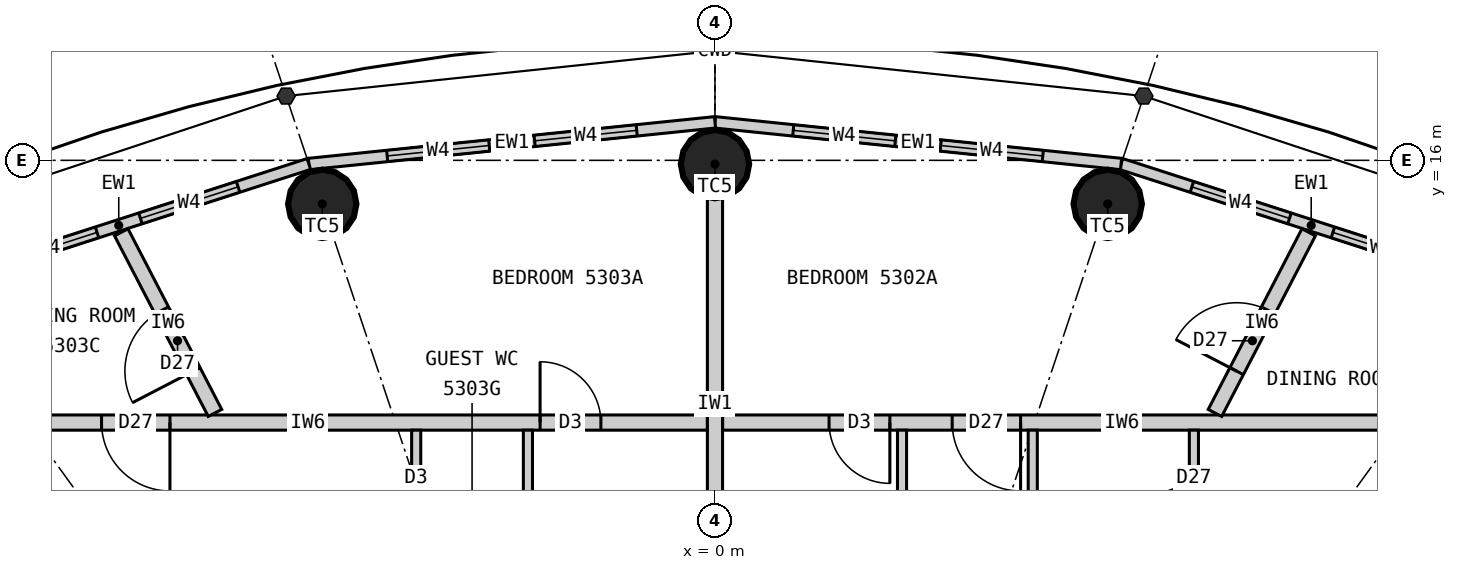
"""IFC4 building model, lengths in metres.
Left out: names, types, materials, properties, quantities, classifications, styles, units other than length and angle.
Written with IfcOpenShell. Run it as: python <this file> out.ifc"""

import sys

from ifc_helpers import new_model, si_unit, direction, frame, frame_2d, origin, origin_2d, place, context, subcontext, project, spatial, rectangle, circle, extrude, element, fill, save


model = new_model("IFC4")
c1 = context("Model", 3, precision=1e-05, world=origin(), true_north=direction((0.0, 1.0)))
c2 = subcontext(c1, "Body", "Model", "MODEL_VIEW")
j1 = project(units=[si_unit("LENGTHUNIT", "METRE"), si_unit("PLANEANGLEUNIT", "RADIAN")], contexts=[c1])
p1 = place(None, origin())
s1 = spatial("IfcSite", under=j1, at=p1, CompositionType="ELEMENT")
p2 = place(p1, origin())
s2 = spatial("IfcBuilding", under=s1, at=p2, CompositionType="ELEMENT")
p3 = place(p2, frame((0.0, 0.0, 199.5)))
s3 = spatial("IfcBuildingStorey", under=s2, at=p3, CompositionType="ELEMENT", Elevation=199.5)
for number, where, z_axis, x_axis in (
    (1, (5.167, 15.427, 0.0), (0.0, 0.0, 1.0), (1.0, 0.0, 0.0)),
    (2, (0.0, 15.95, 0.0), (0.0, 0.0, 1.0), (1.0, 0.0, 0.0)),
    (3, (-5.167, 15.427, 0.0), (0.0, 0.0, 1.0), (1.0, 0.0, 0.0)),
):
    element("IfcColumn", number, at=place(p3, frame(where, z_axis=z_axis, x_axis=x_axis)), inside=s3, PredefinedType="COLUMN", context=c2, shape_type="SweptSolid", body=[
        extrude(circle(Radius=0.45, at=origin_2d()), origin(), (0.0, 0.0, 1.0), 3.3),
    ])
p4 = place(p3, frame((10.346, 14.336, 0.0), z_axis=(0.0, 0.0, 1.0), x_axis=(-0.951644702515, 0.307200846638, 0.0)))
e4 = element("IfcWall", 4, at=p4, inside=s3, PredefinedType="ELEMENTEDWALL", context=c2, shape_type="SweptSolid", body=[
    extrude(rectangle(XDim=5.258, YDim=0.15, at=frame_2d((2.629, 0.0))), origin(), (0.0, 0.0, 1.0), 3.12),
])
p5 = place(p4, frame((0.979, 0.0, 0.9)))
e5 = element("IfcOpeningElement", 5, at=p5, cuts=e4, PredefinedType="OPENING", context=c2, shape_type="SweptSolid", body=[
    extrude(rectangle(XDim=1.35, YDim=1.9, at=frame_2d((0.675, 0.95))), frame((0.0, 0.085, 0.0), z_axis=(0.0, -1.0, 0.0), x_axis=(1.0, 0.0, 0.0)), (0.0, 0.0, 1.0), 0.17),
])
p6 = place(p4, frame((2.929, 0.0, 0.9)))
e6 = element("IfcOpeningElement", 6, at=p6, cuts=e4, PredefinedType="OPENING", context=c2, shape_type="SweptSolid", body=[
    extrude(rectangle(XDim=1.35, YDim=1.9, at=frame_2d((0.675, 0.95))), frame((0.0, 0.085, 0.0), z_axis=(0.0, -1.0, 0.0), x_axis=(1.0, 0.0, 0.0)), (0.0, 0.0, 1.0), 0.17),
])
p7 = place(p3, frame((5.343, 15.952, 0.0), z_axis=(0.0, 0.0, 1.0), x_axis=(-0.994774574972, 0.102095763818, 0.0)))
e7 = element("IfcWall", 7, at=p7, inside=s3, PredefinedType="ELEMENTEDWALL", context=c2, shape_type="SweptSolid", body=[
    extrude(rectangle(XDim=5.371, YDim=0.15, at=frame_2d((2.686, 0.0))), origin(), (0.0, 0.0, 1.0), 3.12),
])
p8 = place(p7, frame((1.035, 0.0, 0.9)))
e8 = element("IfcOpeningElement", 8, at=p8, cuts=e7, PredefinedType="OPENING", context=c2, shape_type="SweptSolid", body=[
    extrude(rectangle(XDim=1.35, YDim=1.9, at=frame_2d((0.675, 0.95))), frame((0.0, 0.085, 0.0), z_axis=(0.0, -1.0, 0.0), x_axis=(1.0, 0.0, 0.0)), (0.0, 0.0, 1.0), 0.17),
])
p9 = place(p7, frame((2.985, 0.0, 0.9)))
e9 = element("IfcOpeningElement", 9, at=p9, cuts=e7, PredefinedType="OPENING", context=c2, shape_type="SweptSolid", body=[
    extrude(rectangle(XDim=1.35, YDim=1.9, at=frame_2d((0.675, 0.95))), frame((0.0, 0.085, 0.0), z_axis=(0.0, -1.0, 0.0), x_axis=(1.0, 0.0, 0.0)), (0.0, 0.0, 1.0), 0.17),
])
p10 = place(p3, frame((0.0, 16.5, 0.0), z_axis=(0.0, 0.0, 1.0), x_axis=(-0.994774574972, -0.102095763818, 0.0)))
e10 = element("IfcWall", 10, at=p10, inside=s3, PredefinedType="ELEMENTEDWALL", context=c2, shape_type="SweptSolid", body=[
    extrude(rectangle(XDim=5.371, YDim=0.15, at=frame_2d((2.686, 0.0))), origin(), (0.0, 0.0, 1.0), 3.12),
])
p11 = place(p10, frame((1.035, 0.0, 0.9)))
e11 = element("IfcOpeningElement", 11, at=p11, cuts=e10, PredefinedType="OPENING", context=c2, shape_type="SweptSolid", body=[
    extrude(rectangle(XDim=1.35, YDim=1.9, at=frame_2d((0.675, 0.95))), frame((0.0, 0.085, 0.0), z_axis=(0.0, -1.0, 0.0), x_axis=(1.0, 0.0, 0.0)), (0.0, 0.0, 1.0), 0.17),
])
p12 = place(p10, frame((2.985, 0.0, 0.9)))
e12 = element("IfcOpeningElement", 12, at=p12, cuts=e10, PredefinedType="OPENING", context=c2, shape_type="SweptSolid", body=[
    extrude(rectangle(XDim=1.35, YDim=1.9, at=frame_2d((0.675, 0.95))), frame((0.0, 0.085, 0.0), z_axis=(0.0, -1.0, 0.0), x_axis=(1.0, 0.0, 0.0)), (0.0, 0.0, 1.0), 0.17),
])
p13 = place(p3, frame((-5.343, 15.952, 0.0), z_axis=(0.0, 0.0, 1.0), x_axis=(-0.951644702515, -0.307200846638, 0.0)))
e13 = element("IfcWall", 13, at=p13, inside=s3, PredefinedType="ELEMENTEDWALL", context=c2, shape_type="SweptSolid", body=[
    extrude(rectangle(XDim=5.258, YDim=0.15, at=frame_2d((2.629, 0.0))), origin(), (0.0, 0.0, 1.0), 3.12),
])
p14 = place(p13, frame((0.979, 0.0, 0.9)))
e14 = element("IfcOpeningElement", 14, at=p14, cuts=e13, PredefinedType="OPENING", context=c2, shape_type="SweptSolid", body=[
    extrude(rectangle(XDim=1.35, YDim=1.9, at=frame_2d((0.675, 0.95))), frame((0.0, 0.085, 0.0), z_axis=(0.0, -1.0, 0.0), x_axis=(1.0, 0.0, 0.0)), (0.0, 0.0, 1.0), 0.17),
])
p15 = place(p13, frame((2.929, 0.0, 0.9)))
e15 = element("IfcOpeningElement", 15, at=p15, cuts=e13, PredefinedType="OPENING", context=c2, shape_type="SweptSolid", body=[
    extrude(rectangle(XDim=1.35, YDim=1.9, at=frame_2d((0.675, 0.95))), frame((0.0, 0.085, 0.0), z_axis=(0.0, -1.0, 0.0), x_axis=(1.0, 0.0, 0.0)), (0.0, 0.0, 1.0), 0.17),
])
p16 = place(p3, frame((0.0, 10.1, 0.0), z_axis=(0.0, 0.0, 1.0), x_axis=(0.0, 1.0, 0.0)))
e16 = element("IfcWall", 16, at=p16, inside=s3, PredefinedType="PARTITIONING", context=c2, shape_type="SweptSolid", body=[
    extrude(rectangle(XDim=5.4, YDim=0.2, at=frame_2d((2.7, 0.0))), origin(), (0.0, 0.0, 1.0), 2.42),
])
p17 = place(p3, frame((10.609, 12.55, 0.0), z_axis=(0.0, 0.0, 1.0), x_axis=(-1.0, 0.0, 0.0)))
e17 = element("IfcWall", 17, at=p17, inside=s3, PredefinedType="PARTITIONING", context=c2, shape_type="SweptSolid", body=[
    extrude(rectangle(XDim=10.508, YDim=0.2, at=frame_2d((5.254, 0.0))), origin(), (0.0, 0.0, 1.0), 3.12),
])
p18 = place(p17, frame((6.588, 0.0, 0.0)))
e18 = element("IfcOpeningElement", 18, at=p18, cuts=e17, PredefinedType="OPENING", context=c2, shape_type="SweptSolid", body=[
    extrude(rectangle(XDim=0.9, YDim=2.1, at=frame_2d((0.45, 1.05))), frame((0.0, 0.11, 0.0), z_axis=(0.0, -1.0, 0.0), x_axis=(1.0, 0.0, 0.0)), (0.0, 0.0, 1.0), 0.22),
])
p19 = place(p17, frame((8.308, 0.0, 0.0)))
e19 = element("IfcOpeningElement", 19, at=p19, cuts=e17, PredefinedType="OPENING", context=c2, shape_type="SweptSolid", body=[
    extrude(rectangle(XDim=0.8, YDim=2.1, at=frame_2d((0.4, 1.05))), frame((0.0, 0.11, 0.0), z_axis=(0.0, -1.0, 0.0), x_axis=(1.0, 0.0, 0.0)), (0.0, 0.0, 1.0), 0.22),
])
p20 = place(p3, frame((6.578, 12.677, 0.0), z_axis=(0.0, 0.0, 1.0), x_axis=(0.460620531465, 0.887597164255, 0.0)))
e20 = element("IfcWall", 20, at=p20, inside=s3, PredefinedType="PARTITIONING", context=c2, shape_type="SweptSolid", body=[
    extrude(rectangle(XDim=2.678, YDim=0.2, at=frame_2d((1.339, 0.0))), origin(), (0.0, 0.0, 1.0), 3.12),
])
p21 = place(p20, frame((0.62, 0.0, 0.0)))
e21 = element("IfcOpeningElement", 21, at=p21, cuts=e20, PredefinedType="OPENING", context=c2, shape_type="SweptSolid", body=[
    extrude(rectangle(XDim=0.9, YDim=2.1, at=frame_2d((0.45, 1.05))), frame((0.0, 0.11, 0.0), z_axis=(0.0, -1.0, 0.0), x_axis=(1.0, 0.0, 0.0)), (0.0, 0.0, 1.0), 0.22),
])
p22 = place(p3, frame((6.301, 10.1, 0.0), z_axis=(0.0, 0.0, 1.0), x_axis=(0.0, 1.0, 0.0)))
e22 = element("IfcWall", 22, at=p22, inside=s3, PredefinedType="PARTITIONING", context=c2, shape_type="SweptSolid", body=[
    extrude(rectangle(XDim=2.35, YDim=0.12, at=frame_2d((1.175, 0.0))), origin(), (0.0, 0.0, 1.0), 3.12),
])
p23 = place(p22, frame((0.72, 0.0, 0.0)))
e23 = element("IfcOpeningElement", 23, at=p23, cuts=e22, PredefinedType="OPENING", context=c2, shape_type="SweptSolid", body=[
    extrude(rectangle(XDim=0.9, YDim=2.1, at=frame_2d((0.45, 1.05))), frame((0.0, 0.07, 0.0), z_axis=(0.0, -1.0, 0.0), x_axis=(1.0, 0.0, 0.0)), (0.0, 0.0, 1.0), 0.14),
])
for number, where, z_axis, x_axis in (
    (24, (4.181, 10.1, 0.0), (0.0, 0.0, 1.0), (0.0, 1.0, 0.0)),
    (25, (2.461, 10.1, 0.0), (0.0, 0.0, 1.0), (0.0, 1.0, 0.0)),
):
    element("IfcWall", number, at=place(p3, frame(where, z_axis=z_axis, x_axis=x_axis)), inside=s3, PredefinedType="PARTITIONING", context=c2, shape_type="SweptSolid", body=[
        extrude(rectangle(XDim=2.35, YDim=0.12, at=frame_2d((1.175, 0.0))), origin(), (0.0, 0.0, 1.0), 3.12),
    ])
p24 = place(p3, frame((-0.101, 12.55, 0.0), z_axis=(0.0, 0.0, 1.0), x_axis=(-1.0, 0.0, 0.0)))
e26 = element("IfcWall", 26, at=p24, inside=s3, PredefinedType="PARTITIONING", context=c2, shape_type="SweptSolid", body=[
    extrude(rectangle(XDim=10.508, YDim=0.2, at=frame_2d((5.254, 0.0))), origin(), (0.0, 0.0, 1.0), 3.12),
])
p25 = place(p24, frame((1.4, 0.0, 0.0)))
e27 = element("IfcOpeningElement", 27, at=p25, cuts=e26, PredefinedType="OPENING", context=c2, shape_type="SweptSolid", body=[
    extrude(rectangle(XDim=0.8, YDim=2.1, at=frame_2d((0.4, 1.05))), frame((0.0, 0.11, 0.0), z_axis=(0.0, -1.0, 0.0), x_axis=(1.0, 0.0, 0.0)), (0.0, 0.0, 1.0), 0.22),
])
p26 = place(p24, frame((7.07, 0.0, 0.0)))
e28 = element("IfcOpeningElement", 28, at=p26, cuts=e26, PredefinedType="OPENING", context=c2, shape_type="SweptSolid", body=[
    extrude(rectangle(XDim=0.9, YDim=2.1, at=frame_2d((0.45, 1.05))), frame((0.0, 0.11, 0.0), z_axis=(0.0, -1.0, 0.0), x_axis=(1.0, 0.0, 0.0)), (0.0, 0.0, 1.0), 0.22),
])
p27 = place(p3, frame((-6.578, 12.677, 0.0), z_axis=(0.0, 0.0, 1.0), x_axis=(-0.460620531465, 0.887597164255, 0.0)))
e29 = element("IfcWall", 29, at=p27, inside=s3, PredefinedType="PARTITIONING", context=c2, shape_type="SweptSolid", body=[
    extrude(rectangle(XDim=2.678, YDim=0.2, at=frame_2d((1.339, 0.0))), origin(), (0.0, 0.0, 1.0), 3.12),
])
p28 = place(p27, frame((0.62, 0.0, 0.0)))
e30 = element("IfcOpeningElement", 30, at=p28, cuts=e29, PredefinedType="OPENING", context=c2, shape_type="SweptSolid", body=[
    extrude(rectangle(XDim=0.9, YDim=2.1, at=frame_2d((0.45, 1.05))), frame((0.0, 0.11, 0.0), z_axis=(0.0, -1.0, 0.0), x_axis=(1.0, 0.0, 0.0)), (0.0, 0.0, 1.0), 0.22),
])
p29 = place(p3, frame((-2.461, 10.1, 0.0), z_axis=(0.0, 0.0, 1.0), x_axis=(0.0, 1.0, 0.0)))
e31 = element("IfcWall", 31, at=p29, inside=s3, PredefinedType="PARTITIONING", context=c2, shape_type="SweptSolid", body=[
    extrude(rectangle(XDim=2.35, YDim=0.12, at=frame_2d((1.175, 0.0))), origin(), (0.0, 0.0, 1.0), 3.12),
])
p30 = place(p3, frame((-3.931, 10.1, 0.0), z_axis=(0.0, 0.0, 1.0), x_axis=(0.0, 1.0, 0.0)))
e32 = element("IfcWall", 32, at=p30, inside=s3, PredefinedType="PARTITIONING", context=c2, shape_type="SweptSolid", body=[
    extrude(rectangle(XDim=2.35, YDim=0.12, at=frame_2d((1.175, 0.0))), origin(), (0.0, 0.0, 1.0), 3.12),
])
p31 = place(p30, frame((0.77, 0.0, 0.0)))
e33 = element("IfcOpeningElement", 33, at=p31, cuts=e32, PredefinedType="OPENING", context=c2, shape_type="SweptSolid", body=[
    extrude(rectangle(XDim=0.8, YDim=2.1, at=frame_2d((0.4, 1.05))), frame((0.0, 0.07, 0.0), z_axis=(0.0, -1.0, 0.0), x_axis=(1.0, 0.0, 0.0)), (0.0, 0.0, 1.0), 0.14),
])
p32 = place(p5, origin())
e34 = element("IfcWindow", 34, at=p32, inside=s3, PartitioningType="SINGLE_PANEL", PredefinedType="WINDOW", context=c2, shape_type="SweptSolid", body=[
    extrude(rectangle(XDim=1.35, YDim=1.9, at=frame_2d((0.675, 0.95))), frame((0.0, 0.03, 0.0), z_axis=(0.0, -1.0, 0.0), x_axis=(1.0, 0.0, 0.0)), (0.0, 0.0, 1.0), 0.06),
])
fill(e5, e34)
p33 = place(p6, origin())
e35 = element("IfcWindow", 35, at=p33, inside=s3, PartitioningType="SINGLE_PANEL", PredefinedType="WINDOW", context=c2, shape_type="SweptSolid", body=[
    extrude(rectangle(XDim=1.35, YDim=1.9, at=frame_2d((0.675, 0.95))), frame((0.0, 0.03, 0.0), z_axis=(0.0, -1.0, 0.0), x_axis=(1.0, 0.0, 0.0)), (0.0, 0.0, 1.0), 0.06),
])
fill(e6, e35)
p34 = place(p8, origin())
e36 = element("IfcWindow", 36, at=p34, inside=s3, PartitioningType="SINGLE_PANEL", PredefinedType="WINDOW", context=c2, shape_type="SweptSolid", body=[
    extrude(rectangle(XDim=1.35, YDim=1.9, at=frame_2d((0.675, 0.95))), frame((0.0, 0.03, 0.0), z_axis=(0.0, -1.0, 0.0), x_axis=(1.0, 0.0, 0.0)), (0.0, 0.0, 1.0), 0.06),
])
fill(e8, e36)
p35 = place(p9, origin())
e37 = element("IfcWindow", 37, at=p35, inside=s3, PartitioningType="SINGLE_PANEL", PredefinedType="WINDOW", context=c2, shape_type="SweptSolid", body=[
    extrude(rectangle(XDim=1.35, YDim=1.9, at=frame_2d((0.675, 0.95))), frame((0.0, 0.03, 0.0), z_axis=(0.0, -1.0, 0.0), x_axis=(1.0, 0.0, 0.0)), (0.0, 0.0, 1.0), 0.06),
])
fill(e9, e37)
p36 = place(p11, origin())
e38 = element("IfcWindow", 38, at=p36, inside=s3, PartitioningType="SINGLE_PANEL", PredefinedType="WINDOW", context=c2, shape_type="SweptSolid", body=[
    extrude(rectangle(XDim=1.35, YDim=1.9, at=frame_2d((0.675, 0.95))), frame((0.0, 0.03, 0.0), z_axis=(0.0, -1.0, 0.0), x_axis=(1.0, 0.0, 0.0)), (0.0, 0.0, 1.0), 0.06),
])
fill(e11, e38)
p37 = place(p12, origin())
e39 = element("IfcWindow", 39, at=p37, inside=s3, PartitioningType="SINGLE_PANEL", PredefinedType="WINDOW", context=c2, shape_type="SweptSolid", body=[
    extrude(rectangle(XDim=1.35, YDim=1.9, at=frame_2d((0.675, 0.95))), frame((0.0, 0.03, 0.0), z_axis=(0.0, -1.0, 0.0), x_axis=(1.0, 0.0, 0.0)), (0.0, 0.0, 1.0), 0.06),
])
fill(e12, e39)
p38 = place(p14, origin())
e40 = element("IfcWindow", 40, at=p38, inside=s3, PartitioningType="SINGLE_PANEL", PredefinedType="WINDOW", context=c2, shape_type="SweptSolid", body=[
    extrude(rectangle(XDim=1.35, YDim=1.9, at=frame_2d((0.675, 0.95))), frame((0.0, 0.03, 0.0), z_axis=(0.0, -1.0, 0.0), x_axis=(1.0, 0.0, 0.0)), (0.0, 0.0, 1.0), 0.06),
])
fill(e14, e40)
p39 = place(p15, origin())
e41 = element("IfcWindow", 41, at=p39, inside=s3, PartitioningType="SINGLE_PANEL", PredefinedType="WINDOW", context=c2, shape_type="SweptSolid", body=[
    extrude(rectangle(XDim=1.35, YDim=1.9, at=frame_2d((0.675, 0.95))), frame((0.0, 0.03, 0.0), z_axis=(0.0, -1.0, 0.0), x_axis=(1.0, 0.0, 0.0)), (0.0, 0.0, 1.0), 0.06),
])
fill(e15, e41)
p40 = place(p23, origin())
e42 = element("IfcDoor", 42, at=p40, inside=s3, OperationType="SINGLE_SWING_LEFT", PredefinedType="DOOR", context=c2, shape_type="SweptSolid", body=[
    extrude(rectangle(XDim=0.9, YDim=2.1, at=frame_2d((0.45, 1.05))), frame((0.0, 0.025, 0.0), z_axis=(0.0, -1.0, 0.0), x_axis=(1.0, 0.0, 0.0)), (0.0, 0.0, 1.0), 0.05),
])
fill(e23, e42)
p41 = place(p18, origin())
e43 = element("IfcDoor", 43, at=p41, inside=s3, OperationType="SINGLE_SWING_LEFT", PredefinedType="DOOR", context=c2, shape_type="SweptSolid", body=[
    extrude(rectangle(XDim=0.9, YDim=2.1, at=frame_2d((0.45, 1.05))), frame((0.0, 0.025, 0.0), z_axis=(0.0, -1.0, 0.0), x_axis=(1.0, 0.0, 0.0)), (0.0, 0.0, 1.0), 0.05),
])
fill(e18, e43)
p42 = place(p19, origin())
e44 = element("IfcDoor", 44, at=p42, inside=s3, OperationType="SINGLE_SWING_LEFT", PredefinedType="DOOR", context=c2, shape_type="SweptSolid", body=[
    extrude(rectangle(XDim=0.8, YDim=2.1, at=frame_2d((0.4, 1.05))), frame((0.0, 0.025, 0.0), z_axis=(0.0, -1.0, 0.0), x_axis=(1.0, 0.0, 0.0)), (0.0, 0.0, 1.0), 0.05),
])
fill(e19, e44)
p43 = place(p21, origin())
e45 = element("IfcDoor", 45, at=p43, inside=s3, OperationType="SINGLE_SWING_LEFT", PredefinedType="DOOR", context=c2, shape_type="SweptSolid", body=[
    extrude(rectangle(XDim=0.9, YDim=2.1, at=frame_2d((0.45, 1.05))), frame((0.0, 0.025, 0.0), z_axis=(0.0, -1.0, 0.0), x_axis=(1.0, 0.0, 0.0)), (0.0, 0.0, 1.0), 0.05),
])
fill(e21, e45)
p44 = place(p25, origin())
e46 = element("IfcDoor", 46, at=p44, inside=s3, OperationType="SINGLE_SWING_RIGHT", PredefinedType="DOOR", context=c2, shape_type="SweptSolid", body=[
    extrude(rectangle(XDim=0.8, YDim=2.1, at=frame_2d((0.4, 1.05))), frame((0.0, 0.025, 0.0), z_axis=(0.0, -1.0, 0.0), x_axis=(1.0, 0.0, 0.0)), (0.0, 0.0, 1.0), 0.05),
])
fill(e27, e46)
p45 = place(p31, origin())
e47 = element("IfcDoor", 47, at=p45, inside=s3, OperationType="SINGLE_SWING_LEFT", PredefinedType="DOOR", context=c2, shape_type="SweptSolid", body=[
    extrude(rectangle(XDim=0.8, YDim=2.1, at=frame_2d((0.4, 1.05))), frame((0.0, 0.025, 0.0), z_axis=(0.0, -1.0, 0.0), x_axis=(1.0, 0.0, 0.0)), (0.0, 0.0, 1.0), 0.05),
])
fill(e33, e47)
p46 = place(p26, origin())
e48 = element("IfcDoor", 48, at=p46, inside=s3, OperationType="SINGLE_SWING_LEFT", PredefinedType="DOOR", context=c2, shape_type="SweptSolid", body=[
    extrude(rectangle(XDim=0.9, YDim=2.1, at=frame_2d((0.45, 1.05))), frame((0.0, 0.025, 0.0), z_axis=(0.0, -1.0, 0.0), x_axis=(1.0, 0.0, 0.0)), (0.0, 0.0, 1.0), 0.05),
])
fill(e28, e48)
p47 = place(p28, origin())
e49 = element("IfcDoor", 49, at=p47, inside=s3, OperationType="SINGLE_SWING_LEFT", PredefinedType="DOOR", context=c2, shape_type="SweptSolid", body=[
    extrude(rectangle(XDim=0.9, YDim=2.1, at=frame_2d((0.45, 1.05))), frame((0.0, 0.025, 0.0), z_axis=(0.0, -1.0, 0.0), x_axis=(1.0, 0.0, 0.0)), (0.0, 0.0, 1.0), 0.05),
])
fill(e30, e49)
save(model, sys.argv[1])
